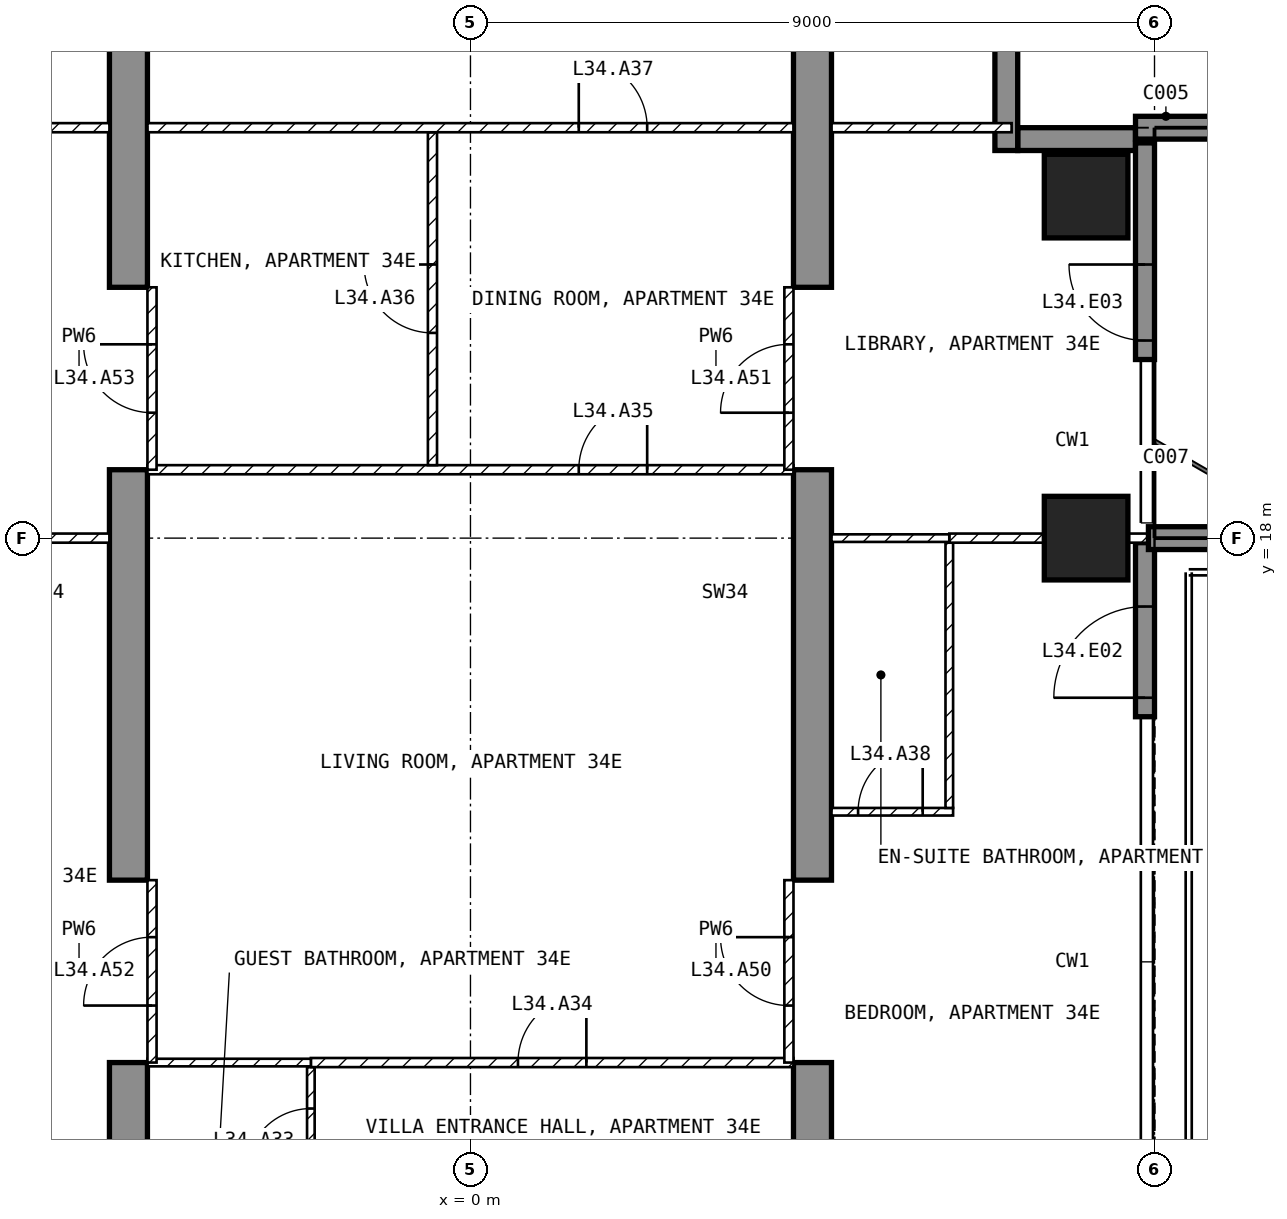
"""IFC4 building model, lengths in metres.
Left out: names, types, materials, properties, quantities, classifications, styles, units other than length and angle.
Written with IfcOpenShell. Run it as: python <this file> out.ifc"""

import sys

from ifc_helpers import new_model, si_unit, direction, frame, frame_2d, origin, origin_2d, place, context, subcontext, project, spatial, polyline, rectangle, outline, extrude, element, fill, save


model = new_model("IFC4")
c1 = context("Model", 3, precision=1e-05, world=origin(), true_north=direction((0.0, 1.0)))
c2 = subcontext(c1, "Body", "Model", "MODEL_VIEW")
j1 = project(units=[si_unit("LENGTHUNIT", "METRE"), si_unit("PLANEANGLEUNIT", "RADIAN")], contexts=[c1])
p1 = place(None, origin())
s1 = spatial("IfcSite", under=j1, at=p1, CompositionType="ELEMENT")
p2 = place(p1, origin())
s2 = spatial("IfcBuilding", under=s1, at=p2, CompositionType="ELEMENT")
p3 = place(p2, frame((0.0, 0.0, 140.9)))
s3 = spatial("IfcBuildingStorey", under=s2, at=p3, CompositionType="ELEMENT", Elevation=140.9)
for number, where, z_axis, x_axis in (
    (1, (8.1, 18.0, -0.25), (0.0, 0.0, 1.0), (1.0, 0.0, 0.0)),
    (2, (8.1, 22.5, -0.25), (0.0, 0.0, 1.0), (1.0, 0.0, 0.0)),
):
    element("IfcColumn", number, at=place(p3, frame(where, z_axis=z_axis, x_axis=x_axis)), inside=s3, PredefinedType="COLUMN", context=c2, shape_type="SweptSolid", body=[
        extrude(rectangle(XDim=1.1, YDim=1.1, at=origin_2d()), origin(), (0.0, 0.0, 1.0), 3.5),
    ])
for number, where, z_axis, x_axis in (
    (3, (-4.75, 9.0, -0.25), (1.0, 0.0, 0.0), (0.0, 1.0, 0.0)),
    (4, (4.25, 9.0, -0.25), (1.0, 0.0, 0.0), (0.0, 1.0, 0.0)),
):
    element("IfcWall", number, at=place(p3, frame(where, z_axis=z_axis, x_axis=x_axis)), inside=s3, PredefinedType="SHEAR", context=c2, shape_type="SweptSolid", body=[
        extrude(outline(polyline([(0.0, 0.0), (2.1, 0.0), (2.1, 2.65), (4.5, 2.65), (4.5, 0.0), (9.9, 0.0), (9.9, 2.65), (12.3, 2.65), (12.3, 0.0), (16.55, 0.0), (16.55, 3.5), (0.0, 3.5), (0.0, 0.0)])), origin(), (0.0, 0.0, 1.0), 0.5),
    ])
p4 = place(p3, frame((8.875, 15.65, 0.0), z_axis=(0.0, 0.0, 1.0), x_axis=(0.0, 1.0, 0.0)))
e5 = element("IfcWall", 5, at=p4, inside=s3, PredefinedType="SOLIDWALL", context=c2, shape_type="SweptSolid", body=[
    extrude(rectangle(XDim=2.29, YDim=0.25, at=frame_2d((1.145, 0.0))), origin(), (0.0, 0.0, 1.0), 3.25),
])
p5 = place(p4, frame((0.25, 0.0, 0.0)))
e6 = element("IfcOpeningElement", 6, at=p5, cuts=e5, PredefinedType="OPENING", context=c2, shape_type="SweptSolid", body=[
    extrude(rectangle(XDim=1.2, YDim=2.4, at=frame_2d((0.6, 1.2))), frame((0.0, 0.135, 0.0), z_axis=(0.0, -1.0, 0.0), x_axis=(1.0, 0.0, 0.0)), (0.0, 0.0, 1.0), 0.27),
])
p6 = place(p3, frame((8.875, 20.35, 0.0), z_axis=(0.0, 0.0, 1.0), x_axis=(0.0, 1.0, 0.0)))
e7 = element("IfcWall", 7, at=p6, inside=s3, PredefinedType="SOLIDWALL", context=c2, shape_type="SweptSolid", body=[
    extrude(rectangle(XDim=2.85, YDim=0.25, at=frame_2d((1.425, 0.0))), origin(), (0.0, 0.0, 1.0), 3.25),
])
p7 = place(p6, frame((0.25, 0.0, 0.0)))
e8 = element("IfcOpeningElement", 8, at=p7, cuts=e7, PredefinedType="OPENING", context=c2, shape_type="SweptSolid", body=[
    extrude(rectangle(XDim=1.0, YDim=2.4, at=frame_2d((0.5, 1.2))), frame((0.0, 0.135, 0.0), z_axis=(0.0, -1.0, 0.0), x_axis=(1.0, 0.0, 0.0)), (0.0, 0.0, 1.0), 0.27),
])
p8 = place(p3, frame((8.75, 23.25, 0.0), z_axis=(0.0, 0.0, 1.0), x_axis=(-1.0, 0.0, 0.0)))
e9 = element("IfcWall", 9, at=p8, inside=s3, PredefinedType="SOLIDWALL", context=c2, shape_type="SweptSolid", body=[
    extrude(rectangle(XDim=1.55, YDim=0.3, at=frame_2d((0.775, 0.0))), origin(), (0.0, 0.0, 1.0), 3.25),
])
p9 = place(p3, frame((7.05, 23.1, 0.0), z_axis=(0.0, 0.0, 1.0), x_axis=(0.0, 1.0, 0.0)))
e10 = element("IfcWall", 10, at=p9, inside=s3, PredefinedType="SOLIDWALL", context=c2, shape_type="SweptSolid", body=[
    extrude(rectangle(XDim=1.8, YDim=0.3, at=frame_2d((0.9, 0.0))), origin(), (0.0, 0.0, 1.0), 3.25),
])
p10 = place(p3, frame((8.92, 18.0, 0.0), z_axis=(0.0, 0.0, 1.0), x_axis=(1.0, 0.0, 0.0)))
e11 = element("IfcWall", 11, at=p10, inside=s3, PredefinedType="SOLIDWALL", context=c2, shape_type="SweptSolid", body=[
    extrude(rectangle(XDim=2.82, YDim=0.3, at=frame_2d((1.41, 0.0))), origin(), (0.0, 0.0, 1.0), 3.25),
])
p11 = place(p3, frame((8.75, 23.4, 0.0), z_axis=(0.0, 0.0, 1.0), x_axis=(1.0, 0.0, 0.0)))
e12 = element("IfcWall", 12, at=p11, inside=s3, PredefinedType="SOLIDWALL", context=c2, shape_type="SweptSolid", body=[
    extrude(rectangle(XDim=2.95, YDim=0.3, at=frame_2d((1.475, 0.0))), origin(), (0.0, 0.0, 1.0), 3.25),
])
p12 = place(p3, frame((-2.1, 9.1, 0.0), z_axis=(0.0, 0.0, 1.0), x_axis=(0.0, 1.0, 0.0)))
e13 = element("IfcWall", 13, at=p12, inside=s3, PredefinedType="PARTITIONING", context=c2, shape_type="SweptSolid", body=[
    extrude(rectangle(XDim=1.94, YDim=0.1, at=frame_2d((0.97, 0.0))), origin(), (0.0, 0.0, 1.0), 3.25),
])
p13 = place(p12, frame((0.545, 0.0, 0.0)))
e14 = element("IfcOpeningElement", 14, at=p13, cuts=e13, PredefinedType="OPENING", context=c2, shape_type="SweptSolid", body=[
    extrude(rectangle(XDim=0.85, YDim=2.1, at=frame_2d((0.425, 1.05))), frame((0.0, 0.06, 0.0), z_axis=(0.0, -1.0, 0.0), x_axis=(1.0, 0.0, 0.0)), (0.0, 0.0, 1.0), 0.12),
])
p14 = place(p3, frame((-2.1, 11.1, 0.0), z_axis=(0.0, 0.0, 1.0), x_axis=(1.0, 0.0, 0.0)))
e15 = element("IfcWall", 15, at=p14, inside=s3, PredefinedType="PARTITIONING", context=c2, shape_type="SweptSolid", body=[
    extrude(rectangle(XDim=6.35, YDim=0.12, at=frame_2d((3.175, 0.0))), origin(), (0.0, 0.0, 1.0), 3.25),
])
p15 = place(p14, frame((2.725, 0.0, 0.0)))
e16 = element("IfcOpeningElement", 16, at=p15, cuts=e15, PredefinedType="OPENING", context=c2, shape_type="SweptSolid", body=[
    extrude(rectangle(XDim=0.9, YDim=2.1, at=frame_2d((0.45, 1.05))), frame((0.0, 0.07, 0.0), z_axis=(0.0, -1.0, 0.0), x_axis=(1.0, 0.0, 0.0)), (0.0, 0.0, 1.0), 0.14),
])
p16 = place(p3, frame((-4.25, 11.1, 0.0), z_axis=(0.0, 0.0, 1.0), x_axis=(1.0, 0.0, 0.0)))
e17 = element("IfcWall", 17, at=p16, inside=s3, PredefinedType="PARTITIONING", context=c2, shape_type="SweptSolid", body=[
    extrude(rectangle(XDim=2.15, YDim=0.1, at=frame_2d((1.075, 0.0))), origin(), (0.0, 0.0, 1.0), 3.25),
])
p17 = place(p3, frame((-4.25, 18.9, 0.0), z_axis=(0.0, 0.0, 1.0), x_axis=(1.0, 0.0, 0.0)))
e18 = element("IfcWall", 18, at=p17, inside=s3, PredefinedType="PARTITIONING", context=c2, shape_type="SweptSolid", body=[
    extrude(rectangle(XDim=8.5, YDim=0.12, at=frame_2d((4.25, 0.0))), origin(), (0.0, 0.0, 1.0), 3.25),
])
p18 = place(p17, frame((5.675, 0.0, 0.0)))
e19 = element("IfcOpeningElement", 19, at=p18, cuts=e18, PredefinedType="OPENING", context=c2, shape_type="SweptSolid", body=[
    extrude(rectangle(XDim=0.9, YDim=2.1, at=frame_2d((0.45, 1.05))), frame((0.0, 0.07, 0.0), z_axis=(0.0, -1.0, 0.0), x_axis=(1.0, 0.0, 0.0)), (0.0, 0.0, 1.0), 0.14),
])
p19 = place(p3, frame((-0.5, 18.96, 0.0), z_axis=(0.0, 0.0, 1.0), x_axis=(0.0, 1.0, 0.0)))
e20 = element("IfcWall", 20, at=p19, inside=s3, PredefinedType="PARTITIONING", context=c2, shape_type="SweptSolid", body=[
    extrude(rectangle(XDim=4.38, YDim=0.12, at=frame_2d((2.19, 0.0))), origin(), (0.0, 0.0, 1.0), 3.25),
])
p20 = place(p19, frame((1.74, 0.0, 0.0)))
e21 = element("IfcOpeningElement", 21, at=p20, cuts=e20, PredefinedType="OPENING", context=c2, shape_type="SweptSolid", body=[
    extrude(rectangle(XDim=0.9, YDim=2.1, at=frame_2d((0.45, 1.05))), frame((0.0, 0.07, 0.0), z_axis=(0.0, -1.0, 0.0), x_axis=(1.0, 0.0, 0.0)), (0.0, 0.0, 1.0), 0.14),
])
p21 = place(p3, frame((-4.25, 23.4, 0.0), z_axis=(0.0, 0.0, 1.0), x_axis=(1.0, 0.0, 0.0)))
e22 = element("IfcWall", 22, at=p21, inside=s3, PredefinedType="PARTITIONING", context=c2, shape_type="SweptSolid", body=[
    extrude(rectangle(XDim=8.5, YDim=0.12, at=frame_2d((4.25, 0.0))), origin(), (0.0, 0.0, 1.0), 3.25),
])
p22 = place(p21, frame((5.675, 0.0, 0.0)))
e23 = element("IfcOpeningElement", 23, at=p22, cuts=e22, PredefinedType="OPENING", context=c2, shape_type="SweptSolid", body=[
    extrude(rectangle(XDim=0.9, YDim=2.1, at=frame_2d((0.45, 1.05))), frame((0.0, 0.07, 0.0), z_axis=(0.0, -1.0, 0.0), x_axis=(1.0, 0.0, 0.0)), (0.0, 0.0, 1.0), 0.14),
])
p23 = place(p3, frame((4.75, 14.4, 0.0), z_axis=(0.0, 0.0, 1.0), x_axis=(1.0, 0.0, 0.0)))
e24 = element("IfcWall", 24, at=p23, inside=s3, PredefinedType="PARTITIONING", context=c2, shape_type="SweptSolid", body=[
    extrude(rectangle(XDim=1.6, YDim=0.1, at=frame_2d((0.8, 0.0))), origin(), (0.0, 0.0, 1.0), 3.25),
])
p24 = place(p23, frame((0.35, 0.0, 0.0)))
e25 = element("IfcOpeningElement", 25, at=p24, cuts=e24, PredefinedType="OPENING", context=c2, shape_type="SweptSolid", body=[
    extrude(rectangle(XDim=0.85, YDim=2.1, at=frame_2d((0.425, 1.05))), frame((0.0, 0.06, 0.0), z_axis=(0.0, -1.0, 0.0), x_axis=(1.0, 0.0, 0.0)), (0.0, 0.0, 1.0), 0.12),
])
p25 = place(p3, frame((6.3, 14.45, 0.0), z_axis=(0.0, 0.0, 1.0), x_axis=(0.0, 1.0, 0.0)))
e26 = element("IfcWall", 26, at=p25, inside=s3, PredefinedType="PARTITIONING", context=c2, shape_type="SweptSolid", body=[
    extrude(rectangle(XDim=3.49, YDim=0.1, at=frame_2d((1.745, 0.0))), origin(), (0.0, 0.0, 1.0), 3.25),
])
p26 = place(p3, frame((6.3, 18.0, 0.0), z_axis=(0.0, 0.0, 1.0), x_axis=(1.0, 0.0, 0.0)))
e27 = element("IfcWall", 27, at=p26, inside=s3, PredefinedType="PARTITIONING", context=c2, shape_type="SweptSolid", body=[
    extrude(rectangle(XDim=2.62, YDim=0.12, at=frame_2d((1.31, 0.0))), origin(), (0.0, 0.0, 1.0), 2.414),
])
p27 = place(p3, frame((4.75, 18.0, 0.0), z_axis=(0.0, 0.0, 1.0), x_axis=(1.0, 0.0, 0.0)))
e28 = element("IfcWall", 28, at=p27, inside=s3, PredefinedType="PARTITIONING", context=c2, shape_type="SweptSolid", body=[
    extrude(rectangle(XDim=1.55, YDim=0.1, at=frame_2d((0.775, 0.0))), origin(), (0.0, 0.0, 1.0), 2.414),
])
p28 = place(p3, frame((4.75, 23.4, 0.0), z_axis=(0.0, 0.0, 1.0), x_axis=(1.0, 0.0, 0.0)))
e29 = element("IfcWall", 29, at=p28, inside=s3, PredefinedType="PARTITIONING", context=c2, shape_type="SweptSolid", body=[
    extrude(rectangle(XDim=2.37, YDim=0.12, at=frame_2d((1.185, 0.0))), origin(), (0.0, 0.0, 1.0), 3.25),
])
p29 = place(p3, frame((-8.92, 18.0, 0.0), z_axis=(0.0, 0.0, 1.0), x_axis=(1.0, 0.0, 0.0)))
e30 = element("IfcWall", 30, at=p29, inside=s3, PredefinedType="PARTITIONING", context=c2, shape_type="SweptSolid", body=[
    extrude(rectangle(XDim=4.17, YDim=0.12, at=frame_2d((2.085, 0.0))), origin(), (0.0, 0.0, 1.0), 2.414),
])
p30 = place(p3, frame((-7.12, 23.4, 0.0), z_axis=(0.0, 0.0, 1.0), x_axis=(1.0, 0.0, 0.0)))
e31 = element("IfcWall", 31, at=p30, inside=s3, PredefinedType="PARTITIONING", context=c2, shape_type="SweptSolid", body=[
    extrude(rectangle(XDim=2.37, YDim=0.12, at=frame_2d((1.185, 0.0))), origin(), (0.0, 0.0, 1.0), 3.25),
])
p31 = place(p3, frame((4.19, 11.1, 0.0), z_axis=(0.0, 0.0, 1.0), x_axis=(0.0, 1.0, 0.0)))
e32 = element("IfcWall", 32, at=p31, inside=s3, PredefinedType="PARTITIONING", context=c2, shape_type="SweptSolid", body=[
    extrude(rectangle(XDim=2.4, YDim=0.12, at=frame_2d((1.2, 0.0))), origin(), (0.0, 0.0, 1.0), 2.4),
])
p32 = place(p31, frame((0.75, 0.0, 0.0)))
e33 = element("IfcOpeningElement", 33, at=p32, cuts=e32, PredefinedType="OPENING", context=c2, shape_type="SweptSolid", body=[
    extrude(rectangle(XDim=0.9, YDim=2.1, at=frame_2d((0.45, 1.05))), frame((0.0, 0.07, 0.0), z_axis=(0.0, -1.0, 0.0), x_axis=(1.0, 0.0, 0.0)), (0.0, 0.0, 1.0), 0.14),
])
p33 = place(p3, frame((4.19, 18.9, 0.0), z_axis=(0.0, 0.0, 1.0), x_axis=(0.0, 1.0, 0.0)))
e34 = element("IfcWall", 34, at=p33, inside=s3, PredefinedType="PARTITIONING", context=c2, shape_type="SweptSolid", body=[
    extrude(rectangle(XDim=2.4, YDim=0.12, at=frame_2d((1.2, 0.0))), origin(), (0.0, 0.0, 1.0), 2.4),
])
p34 = place(p33, frame((0.75, 0.0, 0.0)))
e35 = element("IfcOpeningElement", 35, at=p34, cuts=e34, PredefinedType="OPENING", context=c2, shape_type="SweptSolid", body=[
    extrude(rectangle(XDim=0.9, YDim=2.1, at=frame_2d((0.45, 1.05))), frame((0.0, 0.07, 0.0), z_axis=(0.0, -1.0, 0.0), x_axis=(1.0, 0.0, 0.0)), (0.0, 0.0, 1.0), 0.14),
])
p35 = place(p3, frame((-4.19, 11.1, 0.0), z_axis=(0.0, 0.0, 1.0), x_axis=(0.0, 1.0, 0.0)))
e36 = element("IfcWall", 36, at=p35, inside=s3, PredefinedType="PARTITIONING", context=c2, shape_type="SweptSolid", body=[
    extrude(rectangle(XDim=2.4, YDim=0.12, at=frame_2d((1.2, 0.0))), origin(), (0.0, 0.0, 1.0), 2.4),
])
p36 = place(p35, frame((0.75, 0.0, 0.0)))
e37 = element("IfcOpeningElement", 37, at=p36, cuts=e36, PredefinedType="OPENING", context=c2, shape_type="SweptSolid", body=[
    extrude(rectangle(XDim=0.9, YDim=2.1, at=frame_2d((0.45, 1.05))), frame((0.0, 0.07, 0.0), z_axis=(0.0, -1.0, 0.0), x_axis=(1.0, 0.0, 0.0)), (0.0, 0.0, 1.0), 0.14),
])
p37 = place(p3, frame((-4.19, 18.9, 0.0), z_axis=(0.0, 0.0, 1.0), x_axis=(0.0, 1.0, 0.0)))
e38 = element("IfcWall", 38, at=p37, inside=s3, PredefinedType="PARTITIONING", context=c2, shape_type="SweptSolid", body=[
    extrude(rectangle(XDim=2.4, YDim=0.12, at=frame_2d((1.2, 0.0))), origin(), (0.0, 0.0, 1.0), 2.4),
])
p38 = place(p37, frame((0.75, 0.0, 0.0)))
e39 = element("IfcOpeningElement", 39, at=p38, cuts=e38, PredefinedType="OPENING", context=c2, shape_type="SweptSolid", body=[
    extrude(rectangle(XDim=0.9, YDim=2.1, at=frame_2d((0.45, 1.05))), frame((0.0, 0.07, 0.0), z_axis=(0.0, -1.0, 0.0), x_axis=(1.0, 0.0, 0.0)), (0.0, 0.0, 1.0), 0.14),
])
p39 = place(p5, origin())
e40 = element("IfcDoor", 40, at=p39, inside=s3, OperationType="SINGLE_SWING_LEFT", PredefinedType="DOOR", context=c2, shape_type="SweptSolid", body=[
    extrude(rectangle(XDim=1.2, YDim=2.4, at=frame_2d((0.6, 1.2))), frame((0.0, 0.025, 0.0), z_axis=(0.0, -1.0, 0.0), x_axis=(1.0, 0.0, 0.0)), (0.0, 0.0, 1.0), 0.05),
])
fill(e6, e40)
p40 = place(p7, origin())
e41 = element("IfcDoor", 41, at=p40, inside=s3, OperationType="SINGLE_SWING_RIGHT", PredefinedType="DOOR", context=c2, shape_type="SweptSolid", body=[
    extrude(rectangle(XDim=1.0, YDim=2.4, at=frame_2d((0.5, 1.2))), frame((0.0, 0.025, 0.0), z_axis=(0.0, -1.0, 0.0), x_axis=(1.0, 0.0, 0.0)), (0.0, 0.0, 1.0), 0.05),
])
fill(e8, e41)
p41 = place(p13, origin())
e42 = element("IfcDoor", 42, at=p41, inside=s3, OperationType="SINGLE_SWING_LEFT", PredefinedType="DOOR", context=c2, shape_type="SweptSolid", body=[
    extrude(rectangle(XDim=0.85, YDim=2.1, at=frame_2d((0.425, 1.05))), frame((0.0, 0.025, 0.0), z_axis=(0.0, -1.0, 0.0), x_axis=(1.0, 0.0, 0.0)), (0.0, 0.0, 1.0), 0.05),
])
fill(e14, e42)
p42 = place(p15, origin())
e43 = element("IfcDoor", 43, at=p42, inside=s3, OperationType="SINGLE_SWING_RIGHT", PredefinedType="DOOR", context=c2, shape_type="SweptSolid", body=[
    extrude(rectangle(XDim=0.9, YDim=2.1, at=frame_2d((0.45, 1.05))), frame((0.0, 0.025, 0.0), z_axis=(0.0, -1.0, 0.0), x_axis=(1.0, 0.0, 0.0)), (0.0, 0.0, 1.0), 0.05),
])
fill(e16, e43)
p43 = place(p18, origin())
e44 = element("IfcDoor", 44, at=p43, inside=s3, OperationType="SINGLE_SWING_RIGHT", PredefinedType="DOOR", context=c2, shape_type="SweptSolid", body=[
    extrude(rectangle(XDim=0.9, YDim=2.1, at=frame_2d((0.45, 1.05))), frame((0.0, 0.025, 0.0), z_axis=(0.0, -1.0, 0.0), x_axis=(1.0, 0.0, 0.0)), (0.0, 0.0, 1.0), 0.05),
])
fill(e19, e44)
p44 = place(p20, origin())
e45 = element("IfcDoor", 45, at=p44, inside=s3, OperationType="SINGLE_SWING_RIGHT", PredefinedType="DOOR", context=c2, shape_type="SweptSolid", body=[
    extrude(rectangle(XDim=0.9, YDim=2.1, at=frame_2d((0.45, 1.05))), frame((0.0, 0.025, 0.0), z_axis=(0.0, -1.0, 0.0), x_axis=(1.0, 0.0, 0.0)), (0.0, 0.0, 1.0), 0.05),
])
fill(e21, e45)
p45 = place(p22, origin())
e46 = element("IfcDoor", 46, at=p45, inside=s3, OperationType="SINGLE_SWING_LEFT", PredefinedType="DOOR", context=c2, shape_type="SweptSolid", body=[
    extrude(rectangle(XDim=0.9, YDim=2.1, at=frame_2d((0.45, 1.05))), frame((0.0, 0.025, 0.0), z_axis=(0.0, -1.0, 0.0), x_axis=(1.0, 0.0, 0.0)), (0.0, 0.0, 1.0), 0.05),
])
fill(e23, e46)
p46 = place(p24, origin())
e47 = element("IfcDoor", 47, at=p46, inside=s3, OperationType="SINGLE_SWING_RIGHT", PredefinedType="DOOR", context=c2, shape_type="SweptSolid", body=[
    extrude(rectangle(XDim=0.85, YDim=2.1, at=frame_2d((0.425, 1.05))), frame((0.0, 0.025, 0.0), z_axis=(0.0, -1.0, 0.0), x_axis=(1.0, 0.0, 0.0)), (0.0, 0.0, 1.0), 0.05),
])
fill(e25, e47)
p47 = place(p32, origin())
e48 = element("IfcDoor", 48, at=p47, inside=s3, OperationType="SINGLE_SWING_RIGHT", PredefinedType="DOOR", context=c2, shape_type="SweptSolid", body=[
    extrude(rectangle(XDim=0.9, YDim=2.1, at=frame_2d((0.45, 1.05))), frame((0.0, 0.025, 0.0), z_axis=(0.0, -1.0, 0.0), x_axis=(1.0, 0.0, 0.0)), (0.0, 0.0, 1.0), 0.05),
])
fill(e33, e48)
p48 = place(p34, origin())
e49 = element("IfcDoor", 49, at=p48, inside=s3, OperationType="SINGLE_SWING_LEFT", PredefinedType="DOOR", context=c2, shape_type="SweptSolid", body=[
    extrude(rectangle(XDim=0.9, YDim=2.1, at=frame_2d((0.45, 1.05))), frame((0.0, 0.025, 0.0), z_axis=(0.0, -1.0, 0.0), x_axis=(1.0, 0.0, 0.0)), (0.0, 0.0, 1.0), 0.05),
])
fill(e35, e49)
p49 = place(p36, origin())
e50 = element("IfcDoor", 50, at=p49, inside=s3, OperationType="SINGLE_SWING_LEFT", PredefinedType="DOOR", context=c2, shape_type="SweptSolid", body=[
    extrude(rectangle(XDim=0.9, YDim=2.1, at=frame_2d((0.45, 1.05))), frame((0.0, 0.025, 0.0), z_axis=(0.0, -1.0, 0.0), x_axis=(1.0, 0.0, 0.0)), (0.0, 0.0, 1.0), 0.05),
])
fill(e37, e50)
p50 = place(p38, origin())
e51 = element("IfcDoor", 51, at=p50, inside=s3, OperationType="SINGLE_SWING_RIGHT", PredefinedType="DOOR", context=c2, shape_type="SweptSolid", body=[
    extrude(rectangle(XDim=0.9, YDim=2.1, at=frame_2d((0.45, 1.05))), frame((0.0, 0.025, 0.0), z_axis=(0.0, -1.0, 0.0), x_axis=(1.0, 0.0, 0.0)), (0.0, 0.0, 1.0), 0.05),
])
fill(e39, e51)
save(model, sys.argv[1])
